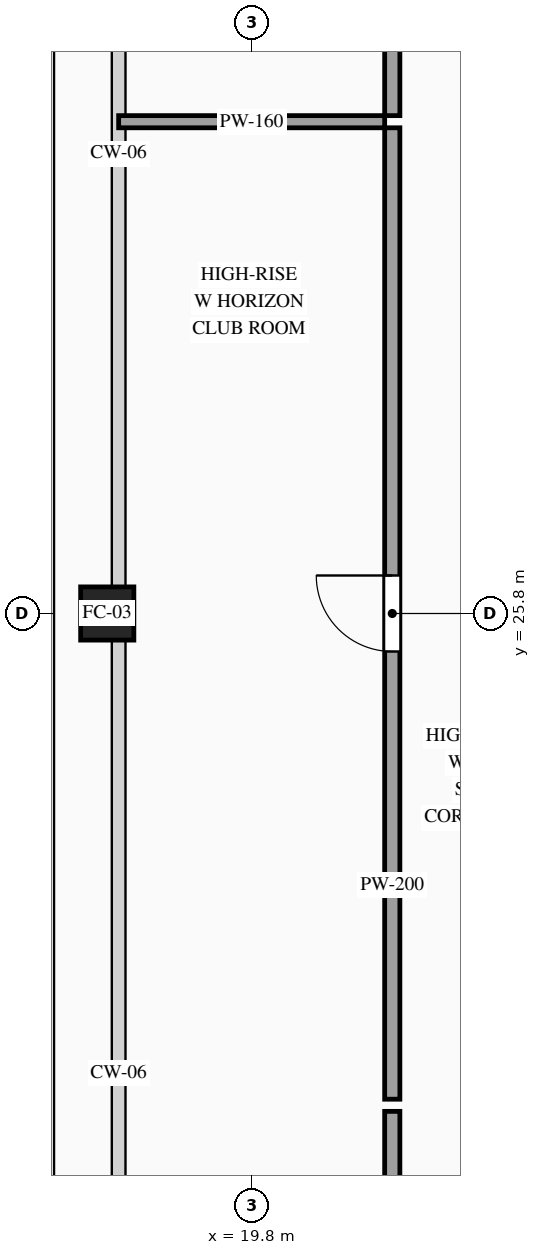
"""IFC4 building model, lengths in metres.
Left out: names, types, materials, properties, quantities, classifications, styles, units other than length and angle.
Written with IfcOpenShell. Run it as: python <this file> out.ifc"""

import sys

from ifc_helpers import new_model, si_unit, direction, frame, frame_2d, origin, origin_2d, place, context, subcontext, project, spatial, rectangle, hollow_rectangle, extrude, source, transform, mapped, element, fill, save


model = new_model("IFC4")
c1 = context("Model", 3, precision=1e-05, world=origin(), true_north=direction((0.0, 1.0)))
c2 = subcontext(c1, "Body", "Model", "MODEL_VIEW")
j1 = project(units=[si_unit("LENGTHUNIT", "METRE"), si_unit("PLANEANGLEUNIT", "RADIAN")], contexts=[c1])
p1 = place(None, origin())
s1 = spatial("IfcSite", under=j1, at=p1, CompositionType="ELEMENT")
p2 = place(p1, origin())
s2 = spatial("IfcBuilding", under=s1, at=p2, CompositionType="ELEMENT")
p3 = place(p2, frame((0.0, 0.0, 314.7)))
s3 = spatial("IfcBuildingStorey", under=s2, at=p3, CompositionType="ELEMENT", Elevation=314.7)
m1 = source(origin(), c2, "Body", "SweptSolid", [
    extrude(hollow_rectangle(XDim=0.7, YDim=0.7, WallThickness=0.032, at=origin_2d()), origin(), (0.0, 0.0, 1.0), 3.5),
])
p4 = place(p3, frame((17.9, 25.8, 0.0), z_axis=(0.0, 0.0, 1.0), x_axis=(1.0, 0.0, 0.0)))
e1 = element("IfcColumn", 1, at=p4, inside=s3, PredefinedType="COLUMN", context=c2, shape_type="MappedRepresentation", body=[
    mapped(m1, transform((0.0, 0.0, 0.0), scale=1.0)),
])
m2 = source(origin(), c2, "Body", "SweptSolid", [
    extrude(rectangle(XDim=1.7, YDim=0.2, at=frame_2d((0.85, 0.0))), origin(), (0.0, 0.0, 1.0), 3.28),
])
for number, where, z_axis, x_axis in (
    (2, (21.65, 32.35, 0.0), (0.0, 0.0, 1.0), (0.0, 1.0, 0.0)),
    (3, (21.65, 17.55, 0.0), (0.0, 0.0, 1.0), (0.0, 1.0, 0.0)),
):
    element("IfcWall", number, at=place(p3, frame(where, z_axis=z_axis, x_axis=x_axis)), inside=s3, PredefinedType="PARTITIONING", context=c2, shape_type="MappedRepresentation", body=[
        mapped(m2, transform((0.0, 0.0, 0.0), scale=1.0)),
    ])
p5 = place(p3, frame((21.65, 19.41, 0.0), z_axis=(0.0, 0.0, 1.0), x_axis=(0.0, 1.0, 0.0)))
e4 = element("IfcWall", 4, at=p5, inside=s3, PredefinedType="PARTITIONING", context=c2, shape_type="SweptSolid", body=[
    extrude(rectangle(XDim=12.78, YDim=0.2, at=frame_2d((6.39, 0.0))), origin(), (0.0, 0.0, 1.0), 3.28),
])
p6 = place(p5, frame((5.89, 0.0, 0.0)))
e5 = element("IfcOpeningElement", 5, at=p6, cuts=e4, PredefinedType="OPENING", context=c2, shape_type="SweptSolid", body=[
    extrude(rectangle(XDim=1.0, YDim=2.2, at=frame_2d((0.5, 1.1))), frame((0.0, 0.115, 0.0), z_axis=(0.0, -1.0, 0.0), x_axis=(1.0, 0.0, 0.0)), (0.0, 0.0, 1.0), 0.23),
])
m3 = source(origin(), c2, "Body", "SweptSolid", [
    extrude(rectangle(XDim=3.5, YDim=0.16, at=frame_2d((1.75, 0.0))), origin(), (0.0, 0.0, 1.0), 2.825),
])
p7 = place(p3, frame((18.05, 32.27, 0.0), z_axis=(0.0, 0.0, 1.0), x_axis=(1.0, 0.0, 0.0)))
e6 = element("IfcWall", 6, at=p7, inside=s3, PredefinedType="PARTITIONING", context=c2, shape_type="MappedRepresentation", body=[
    mapped(m3, transform((0.0, 0.0, 0.0), scale=1.0)),
])
m4 = source(origin(), c2, "Body", "SweptSolid", [
    extrude(rectangle(XDim=1.0, YDim=2.2, at=frame_2d((0.5, 1.1))), frame((0.0, 0.025, 0.0), z_axis=(0.0, -1.0, 0.0), x_axis=(1.0, 0.0, 0.0)), (0.0, 0.0, 1.0), 0.05),
])
p8 = place(p6, origin())
e7 = element("IfcDoor", 7, at=p8, inside=s3, OperationType="SINGLE_SWING_RIGHT", PredefinedType="DOOR", context=c2, shape_type="MappedRepresentation", body=[
    mapped(m4, transform((0.0, 0.0, 0.0), scale=1.0)),
])
fill(e5, e7)
save(model, sys.argv[1])
